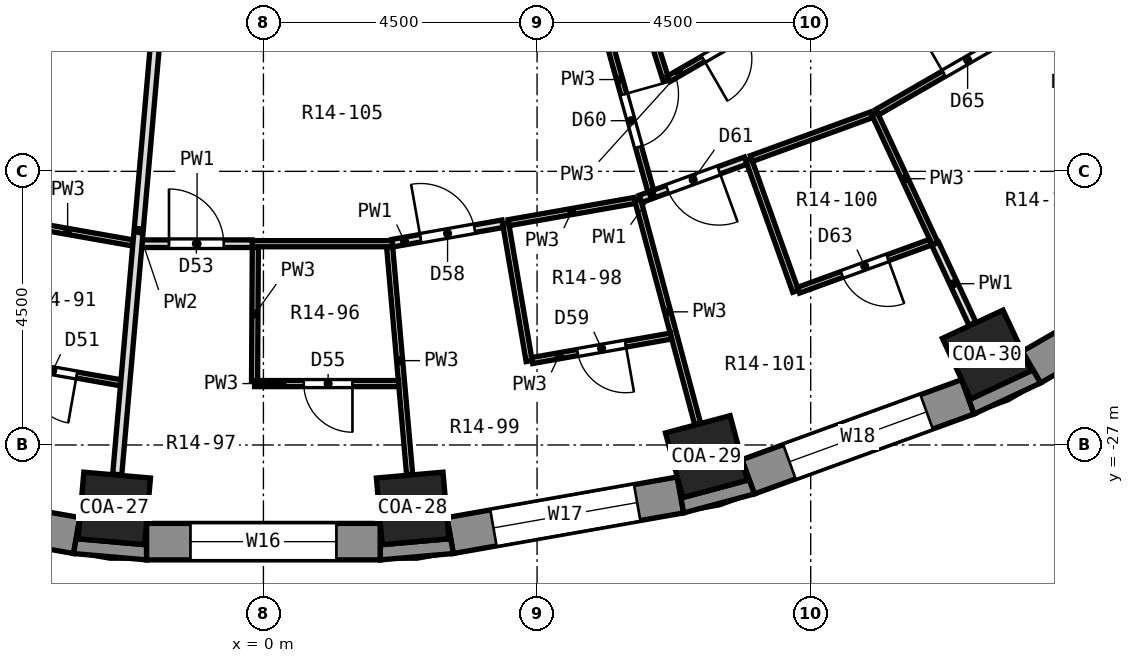
"""IFC4 building model, lengths in metres.
Left out: names, types, materials, properties, quantities, classifications, styles, units other than length and angle.
Written with IfcOpenShell. Run it as: python <this file> out.ifc"""

import sys

from ifc_helpers import new_model, si_unit, direction, frame, frame_2d, origin, origin_2d, place, context, subcontext, project, spatial, polyline, rectangle, outline, extrude, element, fill, save


model = new_model("IFC4")
c1 = context("Model", 3, precision=1e-05, world=origin(), true_north=direction((0.0, 1.0)))
c2 = subcontext(c1, "Body", "Model", "MODEL_VIEW")
j1 = project(units=[si_unit("LENGTHUNIT", "METRE"), si_unit("PLANEANGLEUNIT", "RADIAN")], contexts=[c1])
p1 = place(None, origin())
s1 = spatial("IfcSite", under=j1, at=p1, CompositionType="ELEMENT")
p2 = place(p1, origin())
s2 = spatial("IfcBuilding", under=s1, at=p2, CompositionType="ELEMENT")
p3 = place(p2, frame((0.0, 0.0, 75.8)))
s3 = spatial("IfcBuildingStorey", under=s2, at=p3, CompositionType="ELEMENT", Elevation=75.8)
for number, where, z_axis, x_axis in (
    (1, (-2.453, -28.043, 0.0), (0.0, 0.0, 1.0), (-0.087, -0.996, 0.0)),
    (2, (2.453, -28.043, 0.0), (0.0, 0.0, 1.0), (0.087, -0.996, 0.0)),
    (3, (7.286, -27.191, 0.0), (0.0, 0.0, 1.0), (0.259, -0.966, 0.0)),
    (4, (11.897, -25.512, 0.0), (0.0, 0.0, 1.0), (0.423, -0.906, 0.0)),
):
    element("IfcColumn", number, at=place(p3, frame(where, z_axis=z_axis, x_axis=x_axis)), inside=s3, PredefinedType="COLUMN", context=c2, shape_type="SweptSolid", body=[
        extrude(rectangle(XDim=1.1, YDim=1.1, at=origin_2d()), origin(), (0.0, 0.0, 1.0), 3.3),
    ])
p4 = place(p3, frame((-6.858, -27.821, 0.0), z_axis=(0.0, 0.0, 1.0), x_axis=(0.984800809218, -0.173687553279, 0.0)))
e5 = element("IfcWall", 5, at=p4, inside=s3, PredefinedType="SOLIDWALL", context=c2, shape_type="SweptSolid", body=[
    extrude(rectangle(XDim=3.846, YDim=0.6, at=frame_2d((1.923, 0.0))), origin(), (0.0, 0.0, 1.0), 2.75),
])
p5 = place(p4, frame((0.723, 0.0, 0.9)))
e6 = element("IfcOpeningElement", 6, at=p5, cuts=e5, PredefinedType="OPENING", context=c2, shape_type="SweptSolid", body=[
    extrude(rectangle(XDim=2.4, YDim=1.8, at=frame_2d((1.2, 0.9))), frame((0.0, 0.312, 0.0), z_axis=(0.0, -1.0, 0.0), x_axis=(1.0, 0.0, 0.0)), (0.0, 0.0, 1.0), 0.624),
])
p6 = place(p3, frame((-1.923, -28.59, 0.0), z_axis=(0.0, 0.0, 1.0), x_axis=(1.0, 0.0, 0.0)))
e7 = element("IfcWall", 7, at=p6, inside=s3, PredefinedType="SOLIDWALL", context=c2, shape_type="SweptSolid", body=[
    extrude(rectangle(XDim=3.846, YDim=0.6, at=frame_2d((1.923, 0.0))), origin(), (0.0, 0.0, 1.0), 2.75),
])
p7 = place(p6, frame((0.723, 0.0, 0.9)))
e8 = element("IfcOpeningElement", 8, at=p7, cuts=e7, PredefinedType="OPENING", context=c2, shape_type="SweptSolid", body=[
    extrude(rectangle(XDim=2.4, YDim=1.8, at=frame_2d((1.2, 0.9))), frame((0.0, 0.312, 0.0), z_axis=(0.0, -1.0, 0.0), x_axis=(1.0, 0.0, 0.0)), (0.0, 0.0, 1.0), 0.624),
])
p8 = place(p3, frame((3.071, -28.489, 0.0), z_axis=(0.0, 0.0, 1.0), x_axis=(0.984800809218, 0.173687553279, 0.0)))
e9 = element("IfcWall", 9, at=p8, inside=s3, PredefinedType="SOLIDWALL", context=c2, shape_type="SweptSolid", body=[
    extrude(rectangle(XDim=3.846, YDim=0.6, at=frame_2d((1.923, 0.0))), origin(), (0.0, 0.0, 1.0), 2.75),
])
p9 = place(p8, frame((0.723, 0.0, 0.9)))
e10 = element("IfcOpeningElement", 10, at=p9, cuts=e9, PredefinedType="OPENING", context=c2, shape_type="SweptSolid", body=[
    extrude(rectangle(XDim=2.4, YDim=1.8, at=frame_2d((1.2, 0.9))), frame((0.0, 0.312, 0.0), z_axis=(0.0, -1.0, 0.0), x_axis=(1.0, 0.0, 0.0)), (0.0, 0.0, 1.0), 0.624),
])
p10 = place(p3, frame((7.971, -27.523, 0.0), z_axis=(0.0, 0.0, 1.0), x_axis=(0.939689588564, 0.342028474173, 0.0)))
e11 = element("IfcWall", 11, at=p10, inside=s3, PredefinedType="SOLIDWALL", context=c2, shape_type="SweptSolid", body=[
    extrude(rectangle(XDim=3.846, YDim=0.6, at=frame_2d((1.923, 0.0))), origin(), (0.0, 0.0, 1.0), 2.75),
])
p11 = place(p10, frame((0.723, 0.0, 0.9)))
e12 = element("IfcOpeningElement", 12, at=p11, cuts=e11, PredefinedType="OPENING", context=c2, shape_type="SweptSolid", body=[
    extrude(rectangle(XDim=2.4, YDim=1.8, at=frame_2d((1.2, 0.9))), frame((0.0, 0.312, 0.0), z_axis=(0.0, -1.0, 0.0), x_axis=(1.0, 0.0, 0.0)), (0.0, 0.0, 1.0), 0.624),
])
p12 = place(p3, frame((12.63, -25.721, 0.0), z_axis=(0.0, 0.0, 1.0), x_axis=(0.86603124159, 0.499989888488, 0.0)))
e13 = element("IfcWall", 13, at=p12, inside=s3, PredefinedType="SOLIDWALL", context=c2, shape_type="SweptSolid", body=[
    extrude(rectangle(XDim=3.846, YDim=0.6, at=frame_2d((1.923, 0.0))), origin(), (0.0, 0.0, 1.0), 2.75),
])
p13 = place(p12, frame((0.723, 0.0, 0.9)))
e14 = element("IfcOpeningElement", 14, at=p13, cuts=e13, PredefinedType="OPENING", context=c2, shape_type="SweptSolid", body=[
    extrude(rectangle(XDim=2.4, YDim=1.8, at=frame_2d((1.2, 0.9))), frame((0.0, 0.312, 0.0), z_axis=(0.0, -1.0, 0.0), x_axis=(1.0, 0.0, 0.0)), (0.0, 0.0, 1.0), 0.624),
])
p14 = place(p3, origin())
e15 = element("IfcWall", 15, at=p14, inside=s3, PredefinedType="SOLIDWALL", context=c2, shape_type="SweptSolid", body=[
    extrude(outline(polyline([(-3.123, -28.785), (-1.923, -28.89), (-1.923, -28.29), (-1.954, -28.639), (-3.049, -28.543), (-3.019, -28.194), (-3.123, -28.785)])), origin(), (0.0, 0.0, 1.0), 2.75),
])
p15 = place(p3, origin())
e16 = element("IfcWall", 16, at=p15, inside=s3, PredefinedType="SOLIDWALL", context=c2, shape_type="SweptSolid", body=[
    extrude(outline(polyline([(1.923, -28.89), (3.123, -28.785), (3.019, -28.194), (3.049, -28.543), (1.954, -28.639), (1.923, -28.29), (1.923, -28.89)])), origin(), (0.0, 0.0, 1.0), 2.75),
])
p16 = place(p3, origin())
e17 = element("IfcWall", 17, at=p16, inside=s3, PredefinedType="SOLIDWALL", context=c2, shape_type="SweptSolid", body=[
    extrude(outline(polyline([(6.91, -28.117), (8.074, -27.805), (7.869, -27.241), (7.959, -27.58), (6.897, -27.865), (6.806, -27.526), (6.91, -28.117)])), origin(), (0.0, 0.0, 1.0), 2.75),
])
p17 = place(p3, origin())
e18 = element("IfcWall", 18, at=p17, inside=s3, PredefinedType="SOLIDWALL", context=c2, shape_type="SweptSolid", body=[
    extrude(outline(polyline([(12.78, -25.981), (12.479, -25.461), (12.628, -25.779), (11.631, -26.243), (11.483, -25.926), (11.688, -26.49), (12.78, -25.981)])), origin(), (0.0, 0.0, 1.0), 2.75),
])
p18 = place(p3, frame((2.075, -23.74, 0.0), z_axis=(0.0, 0.0, 1.0), x_axis=(0.087473063517, -0.996166885195, 0.0)))
e19 = element("IfcWall", 19, at=p18, inside=s3, PredefinedType="PARTITIONING", context=c2, shape_type="SweptSolid", body=[
    extrude(rectangle(XDim=3.76, YDim=0.1, at=frame_2d((1.88, 0.0))), origin(), (0.0, 0.0, 1.0), 2.75),
])
p19 = place(p3, frame((3.983, -23.353, 0.0), z_axis=(0.0, 0.0, 1.0), x_axis=(0.168356840278, -0.985726115273, 0.0)))
e20 = element("IfcWall", 20, at=p19, inside=s3, PredefinedType="PARTITIONING", context=c2, shape_type="SweptSolid", body=[
    extrude(rectangle(XDim=2.3, YDim=0.1, at=frame_2d((1.15, 0.0))), origin(), (0.0, 0.0, 1.0), 2.75),
])
p20 = place(p3, frame((6.155, -22.97, 0.0), z_axis=(0.0, 0.0, 1.0), x_axis=(0.258575921205, -0.965990938349, 0.0)))
e21 = element("IfcWall", 21, at=p20, inside=s3, PredefinedType="PARTITIONING", context=c2, shape_type="SweptSolid", body=[
    extrude(rectangle(XDim=3.81, YDim=0.1, at=frame_2d((1.905, 0.0))), origin(), (0.0, 0.0, 1.0), 2.75),
])
p21 = place(p3, frame((5.401, -19.353, 0.0), z_axis=(0.0, 0.0, 1.0), x_axis=(0.268838425597, -0.963185288988, 0.0)))
e22 = element("IfcWall", 22, at=p21, inside=s3, PredefinedType="PARTITIONING", context=c2, shape_type="SweptSolid", body=[
    extrude(rectangle(XDim=3.604, YDim=0.1, at=frame_2d((1.802, 0.0))), origin(), (0.0, 0.0, 1.0), 2.75),
])
p22 = place(p21, frame((1.952, 0.0, 0.0)))
e23 = element("IfcOpeningElement", 23, at=p22, cuts=e22, PredefinedType="OPENING", context=c2, shape_type="SweptSolid", body=[
    extrude(rectangle(XDim=0.9, YDim=2.1, at=frame_2d((0.45, 1.05))), frame((0.0, 0.062, 0.0), z_axis=(0.0, -1.0, 0.0), x_axis=(1.0, 0.0, 0.0)), (0.0, 0.0, 1.0), 0.124),
])
p23 = place(p3, frame((5.994, -19.011, 0.0), z_axis=(0.0, 0.0, 1.0), x_axis=(0.30075653294, -0.953700953074, 0.0)))
e24 = element("IfcWall", 24, at=p23, inside=s3, PredefinedType="PARTITIONING", context=c2, shape_type="SweptSolid", body=[
    extrude(rectangle(XDim=2.089, YDim=0.1, at=frame_2d((1.044, 0.0))), origin(), (0.0, 0.0, 1.0), 2.75),
])
p24 = place(p3, frame((7.978, -22.306, 0.0), z_axis=(0.0, 0.0, 1.0), x_axis=(0.336470872414, -0.941693873834, 0.0)))
e25 = element("IfcWall", 25, at=p24, inside=s3, PredefinedType="PARTITIONING", context=c2, shape_type="SweptSolid", body=[
    extrude(rectangle(XDim=2.3, YDim=0.1, at=frame_2d((1.15, 0.0))), origin(), (0.0, 0.0, 1.0), 2.75),
])
p25 = place(p3, frame((10.05, -21.552, 0.0), z_axis=(0.0, 0.0, 1.0), x_axis=(0.422500217466, -0.906362822627, 0.0)))
e26 = element("IfcWall", 26, at=p25, inside=s3, PredefinedType="PARTITIONING", context=c2, shape_type="SweptSolid", body=[
    extrude(rectangle(XDim=2.359, YDim=0.1, at=frame_2d((1.18, 0.0))), origin(), (0.0, 0.0, 1.0), 2.75),
])
p26 = place(p3, frame((11.047, -23.69, 0.0), z_axis=(0.0, 0.0, 1.0), x_axis=(0.42247077632, -0.906376546009, 0.0)))
e27 = element("IfcWall", 27, at=p26, inside=s3, PredefinedType="PARTITIONING", context=c2, shape_type="SweptSolid", body=[
    extrude(rectangle(XDim=1.45, YDim=0.125, at=frame_2d((0.725, 0.0))), origin(), (0.0, 0.0, 1.0), 2.75),
])
p27 = place(p3, frame((-4.656, -25.57, 0.0), z_axis=(0.0, 0.0, 1.0), x_axis=(0.984807668853, -0.173648654958, 0.0)))
e28 = element("IfcWall", 28, at=p27, inside=s3, PredefinedType="PARTITIONING", context=c2, shape_type="SweptSolid", body=[
    extrude(rectangle(XDim=2.344, YDim=0.1, at=frame_2d((1.172, 0.0))), origin(), (0.0, 0.0, 1.0), 2.75),
])
p28 = place(p27, frame((0.809, 0.0, 0.0)))
e29 = element("IfcOpeningElement", 29, at=p28, cuts=e28, PredefinedType="OPENING", context=c2, shape_type="SweptSolid", body=[
    extrude(rectangle(XDim=0.8, YDim=2.1, at=frame_2d((0.4, 1.05))), frame((0.0, 0.062, 0.0), z_axis=(0.0, -1.0, 0.0), x_axis=(1.0, 0.0, 0.0)), (0.0, 0.0, 1.0), 0.124),
])
p29 = place(p3, frame((-4.293, -23.298, 0.0), z_axis=(0.0, 0.0, 1.0), x_axis=(0.984790324535, -0.173746990485, 0.0)))
e30 = element("IfcWall", 30, at=p29, inside=s3, PredefinedType="PARTITIONING", context=c2, shape_type="SweptSolid", body=[
    extrude(rectangle(XDim=2.179, YDim=0.1, at=frame_2d((1.09, 0.0))), origin(), (0.0, 0.0, 1.0), 2.75),
])
p30 = place(p3, frame((-0.146, -25.99, 0.0), z_axis=(0.0, 0.0, 1.0), x_axis=(1.0, 0.0, 0.0)))
e31 = element("IfcWall", 31, at=p30, inside=s3, PredefinedType="PARTITIONING", context=c2, shape_type="SweptSolid", body=[
    extrude(rectangle(XDim=2.37, YDim=0.1, at=frame_2d((1.185, 0.0))), origin(), (0.0, 0.0, 1.0), 2.75),
])
p31 = place(p30, frame((0.81, 0.0, 0.0)))
e32 = element("IfcOpeningElement", 32, at=p31, cuts=e31, PredefinedType="OPENING", context=c2, shape_type="SweptSolid", body=[
    extrude(rectangle(XDim=0.8, YDim=2.1, at=frame_2d((0.4, 1.05))), frame((0.0, 0.062, 0.0), z_axis=(0.0, -1.0, 0.0), x_axis=(1.0, 0.0, 0.0)), (0.0, 0.0, 1.0), 0.124),
])
p32 = place(p3, frame((-0.183, -23.69, 0.0), z_axis=(0.0, 0.0, 1.0), x_axis=(1.0, 0.0, 0.0)))
e33 = element("IfcWall", 33, at=p32, inside=s3, PredefinedType="PARTITIONING", context=c2, shape_type="SweptSolid", body=[
    extrude(rectangle(XDim=2.307, YDim=0.1, at=frame_2d((1.153, 0.0))), origin(), (0.0, 0.0, 1.0), 2.75),
])
p33 = place(p3, frame((-1.998, -23.69, 0.0), z_axis=(0.0, 0.0, 1.0), x_axis=(1.0, 0.0, 0.0)))
e34 = element("IfcWall", 34, at=p33, inside=s3, PredefinedType="PARTITIONING", context=c2, shape_type="SweptSolid", body=[
    extrude(rectangle(XDim=1.815, YDim=0.125, at=frame_2d((0.907, 0.0))), origin(), (0.0, 0.0, 1.0), 2.75),
])
p34 = place(p33, frame((0.445, 0.0, 0.0)))
e35 = element("IfcOpeningElement", 35, at=p34, cuts=e34, PredefinedType="OPENING", context=c2, shape_type="SweptSolid", body=[
    extrude(rectangle(XDim=0.9, YDim=2.1, at=frame_2d((0.45, 1.05))), frame((0.0, 0.074, 0.0), z_axis=(0.0, -1.0, 0.0), x_axis=(1.0, 0.0, 0.0)), (0.0, 0.0, 1.0), 0.149),
])
p35 = place(p3, frame((4.419, -25.611, 0.0), z_axis=(0.0, 0.0, 1.0), x_axis=(0.984814280308, 0.173611155466, 0.0)))
e36 = element("IfcWall", 36, at=p35, inside=s3, PredefinedType="PARTITIONING", context=c2, shape_type="SweptSolid", body=[
    extrude(rectangle(XDim=2.319, YDim=0.1, at=frame_2d((1.159, 0.0))), origin(), (0.0, 0.0, 1.0), 2.75),
])
p36 = place(p35, frame((0.76, 0.0, 0.0)))
e37 = element("IfcOpeningElement", 37, at=p36, cuts=e36, PredefinedType="OPENING", context=c2, shape_type="SweptSolid", body=[
    extrude(rectangle(XDim=0.8, YDim=2.1, at=frame_2d((0.4, 1.05))), frame((0.0, 0.062, 0.0), z_axis=(0.0, -1.0, 0.0), x_axis=(1.0, 0.0, 0.0)), (0.0, 0.0, 1.0), 0.124),
])
p37 = place(p3, frame((4.032, -23.344, 0.0), z_axis=(0.0, 0.0, 1.0), x_axis=(0.984818559242, 0.173586881336, 0.0)))
e38 = element("IfcWall", 38, at=p37, inside=s3, PredefinedType="PARTITIONING", context=c2, shape_type="SweptSolid", body=[
    extrude(rectangle(XDim=2.105, YDim=0.1, at=frame_2d((1.053, 0.0))), origin(), (0.0, 0.0, 1.0), 2.75),
])
p38 = place(p3, frame((2.122, -23.681, 0.0), z_axis=(0.0, 0.0, 1.0), x_axis=(0.984770194999, 0.173861045209, 0.0)))
e39 = element("IfcWall", 39, at=p38, inside=s3, PredefinedType="PARTITIONING", context=c2, shape_type="SweptSolid", body=[
    extrude(rectangle(XDim=1.84, YDim=0.125, at=frame_2d((0.92, 0.0))), origin(), (0.0, 0.0, 1.0), 2.75),
])
p39 = place(p38, frame((0.47, 0.0, 0.0)))
e40 = element("IfcOpeningElement", 40, at=p39, cuts=e39, PredefinedType="OPENING", context=c2, shape_type="SweptSolid", body=[
    extrude(rectangle(XDim=0.9, YDim=2.1, at=frame_2d((0.45, 1.05))), frame((0.0, 0.074, 0.0), z_axis=(0.0, -1.0, 0.0), x_axis=(1.0, 0.0, 0.0)), (0.0, 0.0, 1.0), 0.149),
])
p40 = place(p3, frame((8.799, -24.455, 0.0), z_axis=(0.0, 0.0, 1.0), x_axis=(0.939774884543, 0.341794040882, 0.0)))
e41 = element("IfcWall", 41, at=p40, inside=s3, PredefinedType="PARTITIONING", context=c2, shape_type="SweptSolid", body=[
    extrude(rectangle(XDim=2.307, YDim=0.1, at=frame_2d((1.154, 0.0))), origin(), (0.0, 0.0, 1.0), 2.75),
])
p41 = place(p40, frame((0.76, 0.0, 0.0)))
e42 = element("IfcOpeningElement", 42, at=p41, cuts=e41, PredefinedType="OPENING", context=c2, shape_type="SweptSolid", body=[
    extrude(rectangle(XDim=0.8, YDim=2.1, at=frame_2d((0.4, 1.05))), frame((0.0, 0.062, 0.0), z_axis=(0.0, -1.0, 0.0), x_axis=(1.0, 0.0, 0.0)), (0.0, 0.0, 1.0), 0.124),
])
p42 = place(p3, frame((8.025, -22.289, 0.0), z_axis=(0.0, 0.0, 1.0), x_axis=(0.939725675468, 0.341929312674, 0.0)))
e43 = element("IfcWall", 43, at=p42, inside=s3, PredefinedType="PARTITIONING", context=c2, shape_type="SweptSolid", body=[
    extrude(rectangle(XDim=2.105, YDim=0.1, at=frame_2d((1.052, 0.0))), origin(), (0.0, 0.0, 1.0), 2.75),
])
p43 = place(p3, frame((6.202, -22.953, 0.0), z_axis=(0.0, 0.0, 1.0), x_axis=(0.939591829345, 0.342296938677, 0.0)))
e44 = element("IfcWall", 44, at=p43, inside=s3, PredefinedType="PARTITIONING", context=c2, shape_type="SweptSolid", body=[
    extrude(rectangle(XDim=1.84, YDim=0.125, at=frame_2d((0.92, 0.0))), origin(), (0.0, 0.0, 1.0), 2.75),
])
p44 = place(p43, frame((0.47, 0.0, 0.0)))
e45 = element("IfcOpeningElement", 45, at=p44, cuts=e44, PredefinedType="OPENING", context=c2, shape_type="SweptSolid", body=[
    extrude(rectangle(XDim=0.9, YDim=2.1, at=frame_2d((0.45, 1.05))), frame((0.0, 0.074, 0.0), z_axis=(0.0, -1.0, 0.0), x_axis=(1.0, 0.0, 0.0)), (0.0, 0.0, 1.0), 0.149),
])
p45 = place(p3, frame((10.093, -21.527, 0.0), z_axis=(0.0, 0.0, 1.0), x_axis=(0.866092412582, 0.499883919394, 0.0)))
e46 = element("IfcWall", 46, at=p45, inside=s3, PredefinedType="PARTITIONING", context=c2, shape_type="SweptSolid", body=[
    extrude(rectangle(XDim=3.534, YDim=0.1, at=frame_2d((1.767, 0.0))), origin(), (0.0, 0.0, 1.0), 2.75),
])
p46 = place(p45, frame((1.267, 0.0, 0.0)))
e47 = element("IfcOpeningElement", 47, at=p46, cuts=e46, PredefinedType="OPENING", context=c2, shape_type="SweptSolid", body=[
    extrude(rectangle(XDim=0.9, YDim=2.1, at=frame_2d((0.45, 1.05))), frame((0.0, 0.062, 0.0), z_axis=(0.0, -1.0, 0.0), x_axis=(1.0, 0.0, 0.0)), (0.0, 0.0, 1.0), 0.124),
])
p47 = place(p3, frame((6.665, -20.978, 0.0), z_axis=(0.0, 0.0, 1.0), x_axis=(0.866048788483, 0.499959494327, 0.0)))
e48 = element("IfcWall", 48, at=p47, inside=s3, PredefinedType="PARTITIONING", context=c2, shape_type="SweptSolid", body=[
    extrude(rectangle(XDim=2.11, YDim=0.1, at=frame_2d((1.055, 0.0))), origin(), (0.0, 0.0, 1.0), 2.75),
])
p48 = place(p47, frame((0.655, 0.0, 0.0)))
e49 = element("IfcOpeningElement", 49, at=p48, cuts=e48, PredefinedType="OPENING", context=c2, shape_type="SweptSolid", body=[
    extrude(rectangle(XDim=0.8, YDim=2.1, at=frame_2d((0.4, 1.05))), frame((0.0, 0.062, 0.0), z_axis=(0.0, -1.0, 0.0), x_axis=(1.0, 0.0, 0.0)), (0.0, 0.0, 1.0), 0.124),
])
p49 = place(p3, frame((-2.404, -27.485, 0.0), z_axis=(0.0, 0.0, 1.0), x_axis=(0.087487718466, 0.99616559824, 0.0)))
e50 = element("IfcWall", 50, at=p49, inside=s3, PredefinedType="PARTITIONING", context=c2, shape_type="SweptSolid", body=[
    extrude(rectangle(XDim=8.053, YDim=0.15, at=frame_2d((4.027, 0.0))), origin(), (0.0, 0.0, 1.0), 2.75),
])
p50 = place(p3, frame((-0.146, -25.94, 0.0), z_axis=(0.0, 0.0, 1.0), x_axis=(0.005691872083, 0.999983801165, 0.0)))
e51 = element("IfcWall", 51, at=p50, inside=s3, PredefinedType="PARTITIONING", context=c2, shape_type="SweptSolid", body=[
    extrude(rectangle(XDim=2.188, YDim=0.1, at=frame_2d((1.094, 0.0))), origin(), (0.0, 0.0, 1.0), 2.75),
])
p51 = place(p7, origin())
e52 = element("IfcWindow", 52, at=p51, inside=s3, PartitioningType="SINGLE_PANEL", PredefinedType="WINDOW", context=c2, shape_type="SweptSolid", body=[
    extrude(rectangle(XDim=2.4, YDim=1.8, at=frame_2d((1.2, 0.9))), frame((0.0, 0.18, 0.0), z_axis=(0.0, -1.0, 0.0), x_axis=(1.0, 0.0, 0.0)), (0.0, 0.0, 1.0), 0.06),
])
fill(e8, e52)
p52 = place(p9, origin())
e53 = element("IfcWindow", 53, at=p52, inside=s3, PartitioningType="SINGLE_PANEL", PredefinedType="WINDOW", context=c2, shape_type="SweptSolid", body=[
    extrude(rectangle(XDim=2.4, YDim=1.8, at=frame_2d((1.2, 0.9))), frame((0.0, 0.18, 0.0), z_axis=(0.0, -1.0, 0.0), x_axis=(1.0, 0.0, 0.0)), (0.0, 0.0, 1.0), 0.06),
])
fill(e10, e53)
p53 = place(p11, origin())
e54 = element("IfcWindow", 54, at=p53, inside=s3, PartitioningType="SINGLE_PANEL", PredefinedType="WINDOW", context=c2, shape_type="SweptSolid", body=[
    extrude(rectangle(XDim=2.4, YDim=1.8, at=frame_2d((1.2, 0.9))), frame((0.0, 0.18, 0.0), z_axis=(0.0, -1.0, 0.0), x_axis=(1.0, 0.0, 0.0)), (0.0, 0.0, 1.0), 0.06),
])
fill(e12, e54)
p54 = place(p28, frame((0.8, 0.0, 0.0), z_axis=(0.0, 0.0, 1.0), x_axis=(-1.0, 0.0, 0.0)))
e55 = element("IfcDoor", 55, at=p54, inside=s3, OperationType="SINGLE_SWING_LEFT", PredefinedType="DOOR", context=c2, shape_type="SweptSolid", body=[
    extrude(rectangle(XDim=0.8, YDim=2.1, at=frame_2d((0.4, 1.05))), frame((0.0, 0.025, 0.0), z_axis=(0.0, -1.0, 0.0), x_axis=(1.0, 0.0, 0.0)), (0.0, 0.0, 1.0), 0.05),
])
fill(e29, e55)
p55 = place(p34, origin())
e56 = element("IfcDoor", 56, at=p55, inside=s3, OperationType="SINGLE_SWING_LEFT", PredefinedType="DOOR", context=c2, shape_type="SweptSolid", body=[
    extrude(rectangle(XDim=0.9, YDim=2.1, at=frame_2d((0.45, 1.05))), frame((0.0, 0.025, 0.0), z_axis=(0.0, -1.0, 0.0), x_axis=(1.0, 0.0, 0.0)), (0.0, 0.0, 1.0), 0.05),
])
fill(e35, e56)
p56 = place(p31, frame((0.8, 0.0, 0.0), z_axis=(0.0, 0.0, 1.0), x_axis=(-1.0, 0.0, 0.0)))
e57 = element("IfcDoor", 57, at=p56, inside=s3, OperationType="SINGLE_SWING_LEFT", PredefinedType="DOOR", context=c2, shape_type="SweptSolid", body=[
    extrude(rectangle(XDim=0.8, YDim=2.1, at=frame_2d((0.4, 1.05))), frame((0.0, 0.025, 0.0), z_axis=(0.0, -1.0, 0.0), x_axis=(1.0, 0.0, 0.0)), (0.0, 0.0, 1.0), 0.05),
])
fill(e32, e57)
p57 = place(p39, origin())
e58 = element("IfcDoor", 58, at=p57, inside=s3, OperationType="SINGLE_SWING_LEFT", PredefinedType="DOOR", context=c2, shape_type="SweptSolid", body=[
    extrude(rectangle(XDim=0.9, YDim=2.1, at=frame_2d((0.45, 1.05))), frame((0.0, 0.025, 0.0), z_axis=(0.0, -1.0, 0.0), x_axis=(1.0, 0.0, 0.0)), (0.0, 0.0, 1.0), 0.05),
])
fill(e40, e58)
p58 = place(p36, frame((0.8, 0.0, 0.0), z_axis=(0.0, 0.0, 1.0), x_axis=(-1.0, 0.0, 0.0)))
e59 = element("IfcDoor", 59, at=p58, inside=s3, OperationType="SINGLE_SWING_LEFT", PredefinedType="DOOR", context=c2, shape_type="SweptSolid", body=[
    extrude(rectangle(XDim=0.8, YDim=2.1, at=frame_2d((0.4, 1.05))), frame((0.0, 0.025, 0.0), z_axis=(0.0, -1.0, 0.0), x_axis=(1.0, 0.0, 0.0)), (0.0, 0.0, 1.0), 0.05),
])
fill(e37, e59)
p59 = place(p22, origin())
e60 = element("IfcDoor", 60, at=p59, inside=s3, OperationType="SINGLE_SWING_LEFT", PredefinedType="DOOR", context=c2, shape_type="SweptSolid", body=[
    extrude(rectangle(XDim=0.9, YDim=2.1, at=frame_2d((0.45, 1.05))), frame((0.0, 0.025, 0.0), z_axis=(0.0, -1.0, 0.0), x_axis=(1.0, 0.0, 0.0)), (0.0, 0.0, 1.0), 0.05),
])
fill(e23, e60)
p60 = place(p44, frame((0.9, 0.0, 0.0), z_axis=(0.0, 0.0, 1.0), x_axis=(-1.0, 0.0, 0.0)))
e61 = element("IfcDoor", 61, at=p60, inside=s3, OperationType="SINGLE_SWING_LEFT", PredefinedType="DOOR", context=c2, shape_type="SweptSolid", body=[
    extrude(rectangle(XDim=0.9, YDim=2.1, at=frame_2d((0.45, 1.05))), frame((0.0, 0.025, 0.0), z_axis=(0.0, -1.0, 0.0), x_axis=(1.0, 0.0, 0.0)), (0.0, 0.0, 1.0), 0.05),
])
fill(e45, e61)
p61 = place(p48, frame((0.8, 0.0, 0.0), z_axis=(0.0, 0.0, 1.0), x_axis=(-1.0, 0.0, 0.0)))
e62 = element("IfcDoor", 62, at=p61, inside=s3, OperationType="SINGLE_SWING_RIGHT", PredefinedType="DOOR", context=c2, shape_type="SweptSolid", body=[
    extrude(rectangle(XDim=0.8, YDim=2.1, at=frame_2d((0.4, 1.05))), frame((0.0, 0.025, 0.0), z_axis=(0.0, -1.0, 0.0), x_axis=(1.0, 0.0, 0.0)), (0.0, 0.0, 1.0), 0.05),
])
fill(e49, e62)
p62 = place(p41, frame((0.8, 0.0, 0.0), z_axis=(0.0, 0.0, 1.0), x_axis=(-1.0, 0.0, 0.0)))
e63 = element("IfcDoor", 63, at=p62, inside=s3, OperationType="SINGLE_SWING_LEFT", PredefinedType="DOOR", context=c2, shape_type="SweptSolid", body=[
    extrude(rectangle(XDim=0.8, YDim=2.1, at=frame_2d((0.4, 1.05))), frame((0.0, 0.025, 0.0), z_axis=(0.0, -1.0, 0.0), x_axis=(1.0, 0.0, 0.0)), (0.0, 0.0, 1.0), 0.05),
])
fill(e42, e63)
p63 = place(p46, origin())
e64 = element("IfcDoor", 64, at=p63, inside=s3, OperationType="SINGLE_SWING_LEFT", PredefinedType="DOOR", context=c2, shape_type="SweptSolid", body=[
    extrude(rectangle(XDim=0.9, YDim=2.1, at=frame_2d((0.45, 1.05))), frame((0.0, 0.025, 0.0), z_axis=(0.0, -1.0, 0.0), x_axis=(1.0, 0.0, 0.0)), (0.0, 0.0, 1.0), 0.05),
])
fill(e47, e64)
save(model, sys.argv[1])
